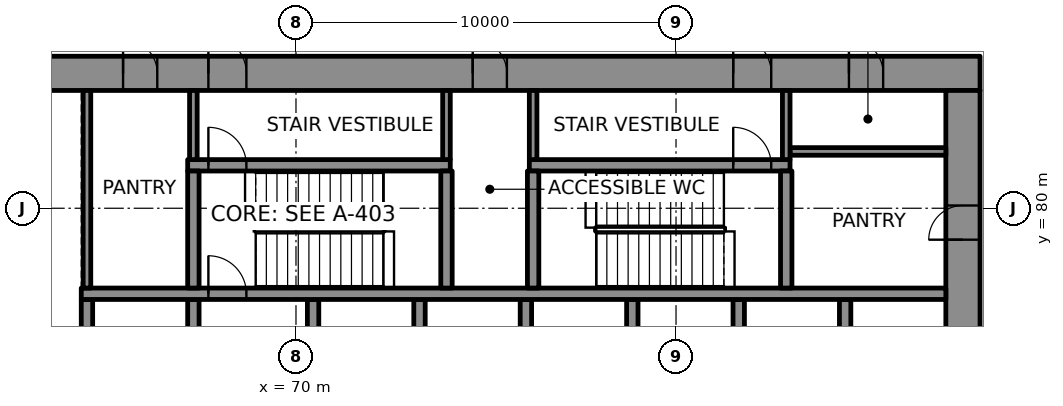
"""IFC4 building model, lengths in metres.
Left out: names, types, materials, properties, quantities, classifications, styles, units other than length and angle.
Written with IfcOpenShell. Run it as: python <this file> out.ifc"""

import sys

from ifc_helpers import new_model, si_unit, direction, frame, frame_2d, origin, place, context, subcontext, project, spatial, rectangle, extrude, element, fill, save


model = new_model("IFC4")
c1 = context("Model", 3, precision=1e-05, world=origin(), true_north=direction((0.0, 1.0)))
c2 = subcontext(c1, "Body", "Model", "MODEL_VIEW")
j1 = project(units=[si_unit("LENGTHUNIT", "METRE"), si_unit("PLANEANGLEUNIT", "RADIAN")], contexts=[c1])
p1 = place(None, origin())
s1 = spatial("IfcSite", under=j1, at=p1, CompositionType="ELEMENT")
p2 = place(p1, origin())
s2 = spatial("IfcBuilding", under=s1, at=p2, CompositionType="ELEMENT")
p3 = place(p2, frame((0.0, 0.0, 26.4)))
s3 = spatial("IfcBuildingStorey", under=s2, at=p3, CompositionType="ELEMENT", Elevation=26.4)
p4 = place(p3, frame((62.0, 83.55, 0.0), z_axis=(0.0, 0.0, 1.0), x_axis=(1.0, 0.0, 0.0)))
e1 = element("IfcWall", 1, at=p4, inside=s3, PredefinedType="SHEAR", context=c2, shape_type="SweptSolid", body=[
    extrude(rectangle(XDim=26.0, YDim=0.9, at=frame_2d((13.0, 0.0))), origin(), (0.0, 0.0, 1.0), 4.15),
])
p5 = place(p4, frame((5.695, 0.0, 0.0)))
e2 = element("IfcOpeningElement", 2, at=p5, cuts=e1, PredefinedType="OPENING", context=c2, shape_type="SweptSolid", body=[
    extrude(rectangle(XDim=1.0, YDim=2.1, at=frame_2d((0.5, 1.05))), frame((0.0, 0.46, 0.0), z_axis=(0.0, -1.0, 0.0), x_axis=(1.0, 0.0, 0.0)), (0.0, 0.0, 1.0), 0.92),
])
p6 = place(p4, frame((19.505, 0.0, 0.0)))
e3 = element("IfcOpeningElement", 3, at=p6, cuts=e1, PredefinedType="OPENING", context=c2, shape_type="SweptSolid", body=[
    extrude(rectangle(XDim=1.0, YDim=2.1, at=frame_2d((0.5, 1.05))), frame((0.0, 0.46, 0.0), z_axis=(0.0, -1.0, 0.0), x_axis=(1.0, 0.0, 0.0)), (0.0, 0.0, 1.0), 0.92),
])
p7 = place(p4, frame((3.45, 0.0, 0.0)))
e4 = element("IfcOpeningElement", 4, at=p7, cuts=e1, PredefinedType="OPENING", context=c2, shape_type="SweptSolid", body=[
    extrude(rectangle(XDim=0.9, YDim=2.1, at=frame_2d((0.45, 1.05))), frame((0.0, 0.46, 0.0), z_axis=(0.0, -1.0, 0.0), x_axis=(1.0, 0.0, 0.0)), (0.0, 0.0, 1.0), 0.92),
])
p8 = place(p4, frame((12.65, 0.0, 0.0)))
e5 = element("IfcOpeningElement", 5, at=p8, cuts=e1, PredefinedType="OPENING", context=c2, shape_type="SweptSolid", body=[
    extrude(rectangle(XDim=0.9, YDim=2.1, at=frame_2d((0.45, 1.05))), frame((0.0, 0.46, 0.0), z_axis=(0.0, -1.0, 0.0), x_axis=(1.0, 0.0, 0.0)), (0.0, 0.0, 1.0), 0.92),
])
p9 = place(p4, frame((22.55, 0.0, 0.0)))
e6 = element("IfcOpeningElement", 6, at=p9, cuts=e1, PredefinedType="OPENING", context=c2, shape_type="SweptSolid", body=[
    extrude(rectangle(XDim=0.9, YDim=2.1, at=frame_2d((0.45, 1.05))), frame((0.0, 0.46, 0.0), z_axis=(0.0, -1.0, 0.0), x_axis=(1.0, 0.0, 0.0)), (0.0, 0.0, 1.0), 0.92),
])
p10 = place(p3, frame((87.55, 66.9, 0.0), z_axis=(0.0, 0.0, 1.0), x_axis=(0.0, 1.0, 0.0)))
e7 = element("IfcWall", 7, at=p10, inside=s3, PredefinedType="SHEAR", context=c2, shape_type="SweptSolid", body=[
    extrude(rectangle(XDim=16.2, YDim=0.9, at=frame_2d((8.1, 0.0))), origin(), (0.0, 0.0, 1.0), 4.15),
])
p11 = place(p10, frame((5.5, 0.0, 0.0)))
e8 = element("IfcOpeningElement", 8, at=p11, cuts=e7, PredefinedType="OPENING", context=c2, shape_type="SweptSolid", body=[
    extrude(rectangle(XDim=1.8, YDim=2.1, at=frame_2d((0.9, 1.05))), frame((0.0, 0.46, 0.0), z_axis=(0.0, -1.0, 0.0), x_axis=(1.0, 0.0, 0.0)), (0.0, 0.0, 1.0), 0.92),
])
p12 = place(p10, frame((12.272, 0.0, 0.0)))
e9 = element("IfcOpeningElement", 9, at=p12, cuts=e7, PredefinedType="OPENING", context=c2, shape_type="SweptSolid", body=[
    extrude(rectangle(XDim=0.9, YDim=2.1, at=frame_2d((0.45, 1.05))), frame((0.0, 0.46, 0.0), z_axis=(0.0, -1.0, 0.0), x_axis=(1.0, 0.0, 0.0)), (0.0, 0.0, 1.0), 0.92),
])
for number, where, z_axis, x_axis in (
    (10, (64.5, 75.0, 0.0), (0.0, 0.0, 1.0), (0.0, 1.0, 0.0)),
    (11, (67.3, 75.0, 0.0), (0.0, 0.0, 1.0), (0.0, 1.0, 0.0)),
):
    element("IfcWall", number, at=place(p3, frame(where, z_axis=z_axis, x_axis=x_axis)), inside=s3, PredefinedType="SHEAR", context=c2, shape_type="SweptSolid", body=[
        extrude(rectangle(XDim=2.6, YDim=0.3, at=frame_2d((1.3, 0.0))), origin(), (0.0, 0.0, 1.0), 4.15),
    ])
p13 = place(p3, frame((70.45, 75.0, 0.0), z_axis=(0.0, 0.0, 1.0), x_axis=(0.0, 1.0, 0.0)))
e12 = element("IfcWall", 12, at=p13, inside=s3, PredefinedType="SHEAR", context=c2, shape_type="SweptSolid", body=[
    extrude(rectangle(XDim=2.6, YDim=0.3, at=frame_2d((1.3, 0.0))), origin(), (0.0, 0.0, 1.0), 4.15),
])
p14 = place(p13, frame((0.15, 0.0, 0.0)))
e13 = element("IfcOpeningElement", 13, at=p14, cuts=e12, PredefinedType="OPENING", context=c2, shape_type="SweptSolid", body=[
    extrude(rectangle(XDim=1.1, YDim=2.1, at=frame_2d((0.55, 1.05))), frame((0.0, 0.16, 0.0), z_axis=(0.0, -1.0, 0.0), x_axis=(1.0, 0.0, 0.0)), (0.0, 0.0, 1.0), 0.32),
])
for number, where, z_axis, x_axis in (
    (14, (73.25, 75.0, 0.0), (0.0, 0.0, 1.0), (0.0, 1.0, 0.0)),
    (15, (76.05, 75.0, 0.0), (0.0, 0.0, 1.0), (0.0, 1.0, 0.0)),
    (16, (78.85, 75.0, 0.0), (0.0, 0.0, 1.0), (0.0, 1.0, 0.0)),
    (17, (81.65, 75.0, 0.0), (0.0, 0.0, 1.0), (0.0, 1.0, 0.0)),
    (18, (84.45, 75.0, 0.0), (0.0, 0.0, 1.0), (0.0, 1.0, 0.0)),
):
    element("IfcWall", number, at=place(p3, frame(where, z_axis=z_axis, x_axis=x_axis)), inside=s3, PredefinedType="SHEAR", context=c2, shape_type="SweptSolid", body=[
        extrude(rectangle(XDim=2.6, YDim=0.3, at=frame_2d((1.3, 0.0))), origin(), (0.0, 0.0, 1.0), 4.15),
    ])
p15 = place(p3, frame((64.35, 77.75, 0.0), z_axis=(0.0, 0.0, 1.0), x_axis=(1.0, 0.0, 0.0)))
e19 = element("IfcWall", 19, at=p15, inside=s3, PredefinedType="SHEAR", context=c2, shape_type="SweptSolid", body=[
    extrude(rectangle(XDim=22.75, YDim=0.3, at=frame_2d((11.375, 0.0))), origin(), (0.0, 0.0, 1.0), 4.15),
])
p16 = place(p15, frame((3.345, 0.0, 0.0)))
e20 = element("IfcOpeningElement", 20, at=p16, cuts=e19, PredefinedType="OPENING", context=c2, shape_type="SweptSolid", body=[
    extrude(rectangle(XDim=1.0, YDim=2.1, at=frame_2d((0.5, 1.05))), frame((0.0, 0.16, 0.0), z_axis=(0.0, -1.0, 0.0), x_axis=(1.0, 0.0, 0.0)), (0.0, 0.0, 1.0), 0.32),
])
p17 = place(p3, frame((67.15, 81.13, 0.0), z_axis=(0.0, 0.0, 1.0), x_axis=(1.0, 0.0, 0.0)))
e21 = element("IfcWall", 21, at=p17, inside=s3, PredefinedType="SHEAR", context=c2, shape_type="SweptSolid", body=[
    extrude(rectangle(XDim=6.91, YDim=0.3, at=frame_2d((3.455, 0.0))), origin(), (0.0, 0.0, 1.0), 4.15),
])
p18 = place(p17, frame((0.545, 0.0, 0.0)))
e22 = element("IfcOpeningElement", 22, at=p18, cuts=e21, PredefinedType="OPENING", context=c2, shape_type="SweptSolid", body=[
    extrude(rectangle(XDim=1.0, YDim=2.1, at=frame_2d((0.5, 1.05))), frame((0.0, 0.16, 0.0), z_axis=(0.0, -1.0, 0.0), x_axis=(1.0, 0.0, 0.0)), (0.0, 0.0, 1.0), 0.32),
])
p19 = place(p3, frame((76.14, 81.13, 0.0), z_axis=(0.0, 0.0, 1.0), x_axis=(1.0, 0.0, 0.0)))
e23 = element("IfcWall", 23, at=p19, inside=s3, PredefinedType="SHEAR", context=c2, shape_type="SweptSolid", body=[
    extrude(rectangle(XDim=6.86, YDim=0.3, at=frame_2d((3.43, 0.0))), origin(), (0.0, 0.0, 1.0), 4.15),
])
p20 = place(p19, frame((5.365, 0.0, 0.0)))
e24 = element("IfcOpeningElement", 24, at=p20, cuts=e23, PredefinedType="OPENING", context=c2, shape_type="SweptSolid", body=[
    extrude(rectangle(XDim=1.0, YDim=2.1, at=frame_2d((0.5, 1.05))), frame((0.0, 0.16, 0.0), z_axis=(0.0, -1.0, 0.0), x_axis=(1.0, 0.0, 0.0)), (0.0, 0.0, 1.0), 0.32),
])
for number, where, z_axis, x_axis in (
    (25, (67.3, 77.9, 0.0), (0.0, 0.0, 1.0), (0.0, 1.0, 0.0)),
    (26, (73.96, 77.9, 0.0), (0.0, 0.0, 1.0), (0.0, 1.0, 0.0)),
    (27, (76.24, 77.9, 0.0), (0.0, 0.0, 1.0), (0.0, 1.0, 0.0)),
    (28, (82.9, 77.9, 0.0), (0.0, 0.0, 1.0), (0.0, 1.0, 0.0)),
):
    element("IfcWall", number, at=place(p3, frame(where, z_axis=z_axis, x_axis=x_axis)), inside=s3, PredefinedType="SHEAR", context=c2, shape_type="SweptSolid", body=[
        extrude(rectangle(XDim=3.08, YDim=0.3, at=frame_2d((1.54, 0.0))), origin(), (0.0, 0.0, 1.0), 4.15),
    ])
p21 = place(p3, frame((83.0, 81.495, 0.0), z_axis=(0.0, 0.0, 1.0), x_axis=(1.0, 0.0, 0.0)))
e29 = element("IfcWall", 29, at=p21, inside=s3, PredefinedType="PARTITIONING", context=c2, shape_type="SweptSolid", body=[
    extrude(rectangle(XDim=4.1, YDim=0.2, at=frame_2d((2.05, 0.0))), origin(), (0.0, 0.0, 1.0), 4.15),
])
p22 = place(p3, frame((64.5, 77.9, 0.0), z_axis=(0.0, 0.0, 1.0), x_axis=(0.0, 1.0, 0.0)))
e30 = element("IfcWall", 30, at=p22, inside=s3, PredefinedType="PARTITIONING", context=c2, shape_type="SweptSolid", body=[
    extrude(rectangle(XDim=5.2, YDim=0.2, at=frame_2d((2.6, 0.0))), origin(), (0.0, 0.0, 1.0), 4.15),
])
for number, where, z_axis, x_axis in (
    (31, (67.3, 81.28, 0.0), (0.0, 0.0, 1.0), (0.0, 1.0, 0.0)),
    (32, (73.96, 81.28, 0.0), (0.0, 0.0, 1.0), (0.0, 1.0, 0.0)),
    (33, (76.24, 81.28, 0.0), (0.0, 0.0, 1.0), (0.0, 1.0, 0.0)),
    (34, (82.9, 81.28, 0.0), (0.0, 0.0, 1.0), (0.0, 1.0, 0.0)),
):
    element("IfcWall", number, at=place(p3, frame(where, z_axis=z_axis, x_axis=x_axis)), inside=s3, PredefinedType="PARTITIONING", context=c2, shape_type="SweptSolid", body=[
        extrude(rectangle(XDim=1.82, YDim=0.2, at=frame_2d((0.91, 0.0))), origin(), (0.0, 0.0, 1.0), 4.15),
    ])
p23 = place(p3, frame((107.02, 62.31, 0.0), z_axis=(0.0, 0.0, 1.0), x_axis=(-0.49999992739, 0.866025445706, 0.0)))
e35 = element("IfcWall", 35, at=p23, inside=s3, PredefinedType="PARAPET", context=c2, shape_type="SweptSolid", body=[
    extrude(rectangle(XDim=54.0, YDim=0.2, at=frame_2d((27.0, 0.0))), origin(), (0.0, 0.0, 1.0), 1.1),
])
p24 = place(p16, origin())
e36 = element("IfcDoor", 36, at=p24, inside=s3, OperationType="SINGLE_SWING_LEFT", PredefinedType="DOOR", context=c2, shape_type="SweptSolid", body=[
    extrude(rectangle(XDim=1.0, YDim=2.1, at=frame_2d((0.5, 1.05))), frame((0.0, 0.025, 0.0), z_axis=(0.0, -1.0, 0.0), x_axis=(1.0, 0.0, 0.0)), (0.0, 0.0, 1.0), 0.05),
])
fill(e20, e36)
p25 = place(p18, origin())
e37 = element("IfcDoor", 37, at=p25, inside=s3, OperationType="SINGLE_SWING_RIGHT", PredefinedType="DOOR", context=c2, shape_type="SweptSolid", body=[
    extrude(rectangle(XDim=1.0, YDim=2.1, at=frame_2d((0.5, 1.05))), frame((0.0, 0.025, 0.0), z_axis=(0.0, -1.0, 0.0), x_axis=(1.0, 0.0, 0.0)), (0.0, 0.0, 1.0), 0.05),
])
fill(e22, e37)
p26 = place(p5, origin())
e38 = element("IfcDoor", 38, at=p26, inside=s3, OperationType="SINGLE_SWING_LEFT", PredefinedType="DOOR", context=c2, shape_type="SweptSolid", body=[
    extrude(rectangle(XDim=1.0, YDim=2.1, at=frame_2d((0.5, 1.05))), frame((0.0, 0.17, 0.0), z_axis=(0.0, -1.0, 0.0), x_axis=(1.0, 0.0, 0.0)), (0.0, 0.0, 1.0), 0.34),
])
fill(e2, e38)
p27 = place(p20, origin())
e39 = element("IfcDoor", 39, at=p27, inside=s3, OperationType="SINGLE_SWING_RIGHT", PredefinedType="DOOR", context=c2, shape_type="SweptSolid", body=[
    extrude(rectangle(XDim=1.0, YDim=2.1, at=frame_2d((0.5, 1.05))), frame((0.0, 0.025, 0.0), z_axis=(0.0, -1.0, 0.0), x_axis=(1.0, 0.0, 0.0)), (0.0, 0.0, 1.0), 0.05),
])
fill(e24, e39)
p28 = place(p6, origin())
e40 = element("IfcDoor", 40, at=p28, inside=s3, OperationType="SINGLE_SWING_LEFT", PredefinedType="DOOR", context=c2, shape_type="SweptSolid", body=[
    extrude(rectangle(XDim=1.0, YDim=2.1, at=frame_2d((0.5, 1.05))), frame((0.0, 0.17, 0.0), z_axis=(0.0, -1.0, 0.0), x_axis=(1.0, 0.0, 0.0)), (0.0, 0.0, 1.0), 0.34),
])
fill(e3, e40)
p29 = place(p7, origin())
e41 = element("IfcDoor", 41, at=p29, inside=s3, OperationType="SINGLE_SWING_RIGHT", PredefinedType="DOOR", context=c2, shape_type="SweptSolid", body=[
    extrude(rectangle(XDim=0.9, YDim=2.1, at=frame_2d((0.45, 1.05))), frame((0.0, 0.17, 0.0), z_axis=(0.0, -1.0, 0.0), x_axis=(1.0, 0.0, 0.0)), (0.0, 0.0, 1.0), 0.34),
])
fill(e4, e41)
p30 = place(p8, origin())
e42 = element("IfcDoor", 42, at=p30, inside=s3, OperationType="SINGLE_SWING_LEFT", PredefinedType="DOOR", context=c2, shape_type="SweptSolid", body=[
    extrude(rectangle(XDim=0.9, YDim=2.1, at=frame_2d((0.45, 1.05))), frame((0.0, 0.17, 0.0), z_axis=(0.0, -1.0, 0.0), x_axis=(1.0, 0.0, 0.0)), (0.0, 0.0, 1.0), 0.34),
])
fill(e5, e42)
p31 = place(p12, origin())
e43 = element("IfcDoor", 43, at=p31, inside=s3, OperationType="SINGLE_SWING_RIGHT", PredefinedType="DOOR", context=c2, shape_type="SweptSolid", body=[
    extrude(rectangle(XDim=0.9, YDim=2.1, at=frame_2d((0.45, 1.05))), frame((0.0, 0.17, 0.0), z_axis=(0.0, -1.0, 0.0), x_axis=(1.0, 0.0, 0.0)), (0.0, 0.0, 1.0), 0.34),
])
fill(e9, e43)
p32 = place(p9, origin())
e44 = element("IfcDoor", 44, at=p32, inside=s3, OperationType="SINGLE_SWING_LEFT", PredefinedType="DOOR", context=c2, shape_type="SweptSolid", body=[
    extrude(rectangle(XDim=0.9, YDim=2.1, at=frame_2d((0.45, 1.05))), frame((0.0, 0.17, 0.0), z_axis=(0.0, -1.0, 0.0), x_axis=(1.0, 0.0, 0.0)), (0.0, 0.0, 1.0), 0.34),
])
fill(e6, e44)
save(model, sys.argv[1])
